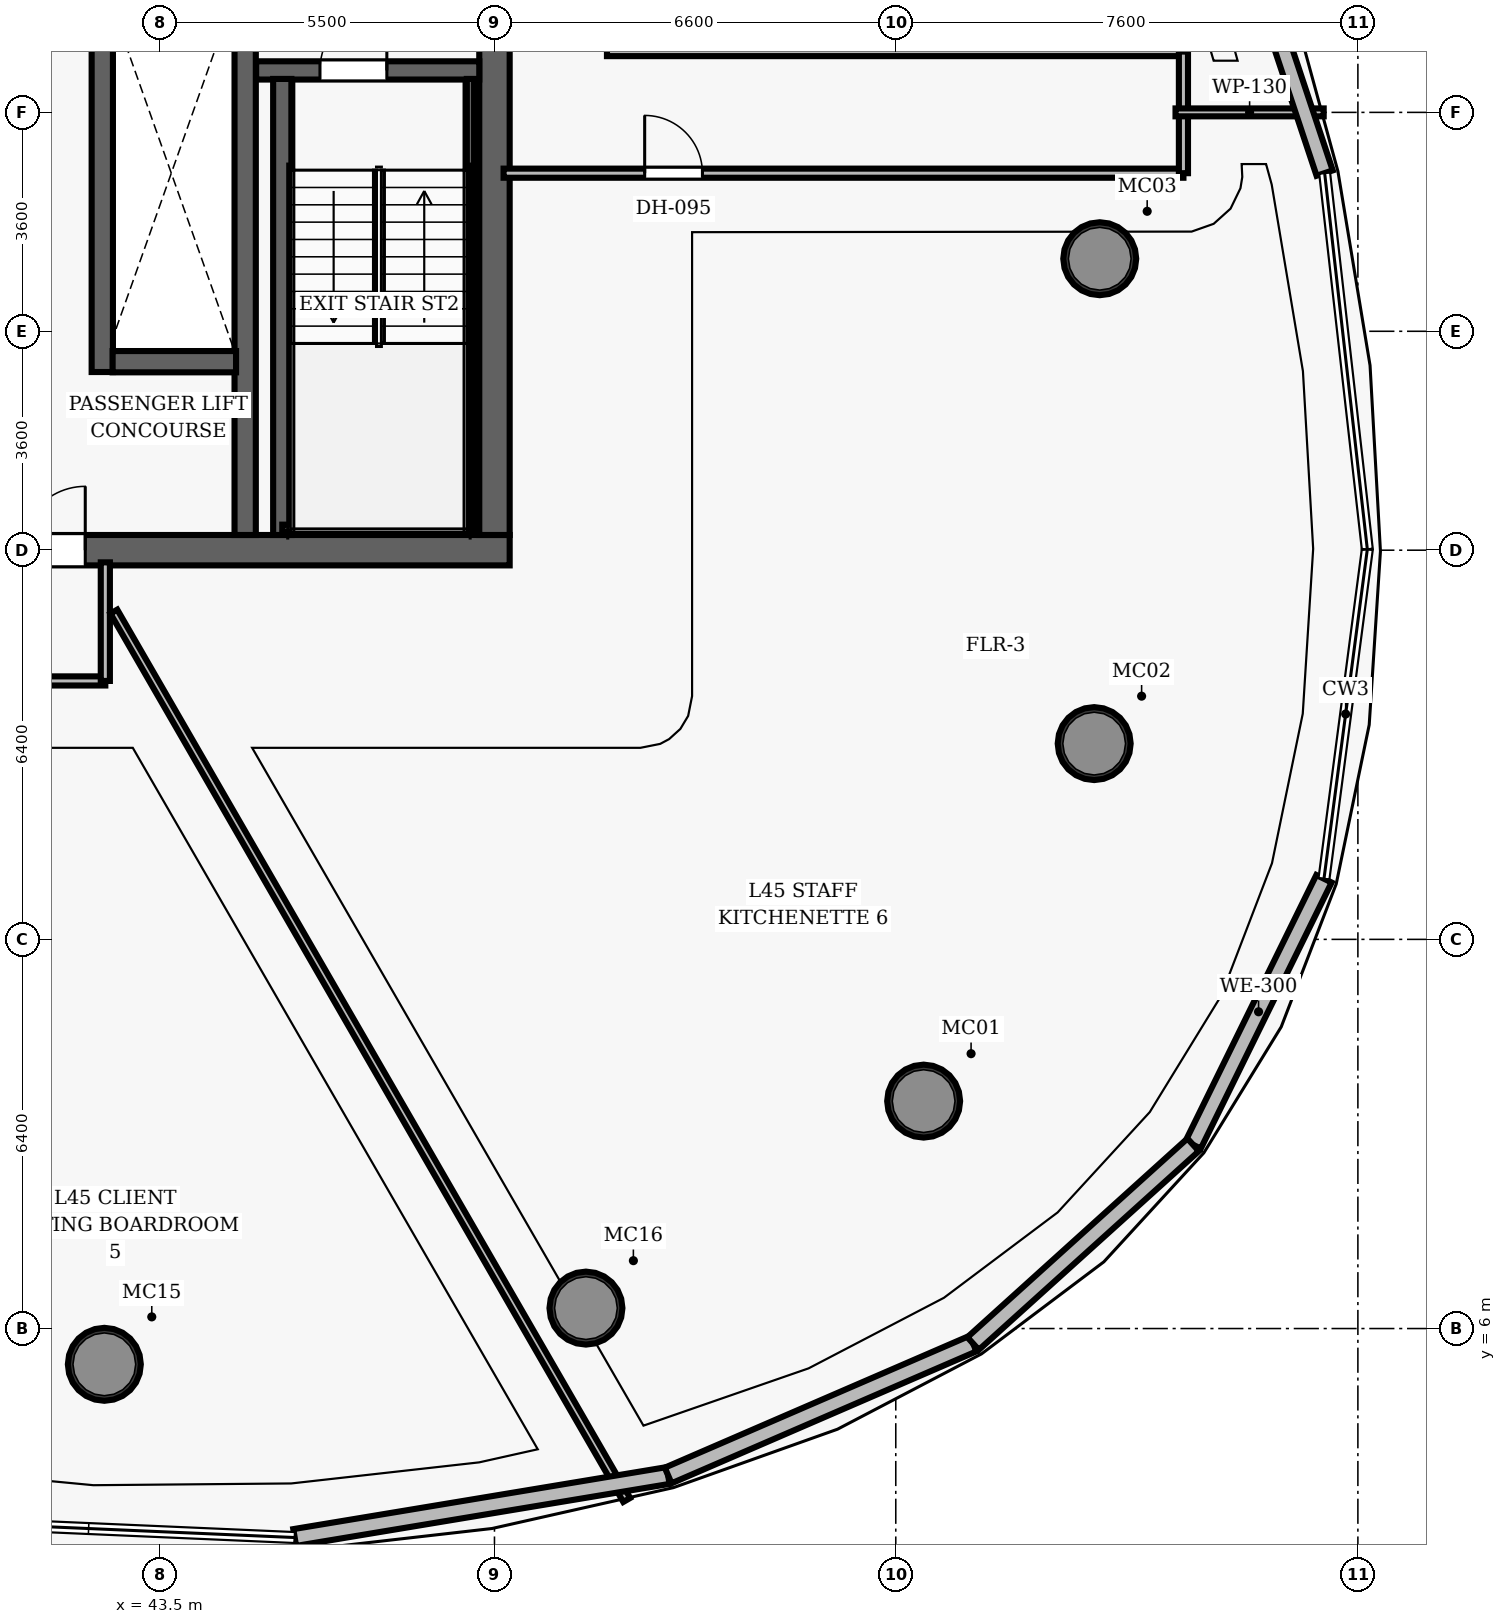
"""IFC4 building model, lengths in metres.
Left out: names, types, materials, properties, quantities, classifications, styles, units other than length and angle.
Written with IfcOpenShell. Run it as: python <this file> out.ifc"""

import sys

from ifc_helpers import new_model, si_unit, direction, frame, frame_2d, origin, origin_2d, place, context, subcontext, project, spatial, rectangle, hollow_circle, extrude, element, fill, save


model = new_model("IFC4")
c1 = context("Model", 3, precision=1e-05, world=origin(), true_north=direction((0.0, 1.0)))
c2 = subcontext(c1, "Body", "Model", "MODEL_VIEW")
j1 = project(units=[si_unit("LENGTHUNIT", "METRE"), si_unit("PLANEANGLEUNIT", "RADIAN")], contexts=[c1])
p1 = place(None, origin())
s1 = spatial("IfcSite", under=j1, at=p1, CompositionType="ELEMENT")
p2 = place(p1, origin())
s2 = spatial("IfcBuilding", under=s1, at=p2, CompositionType="ELEMENT")
p3 = place(p2, frame((0.0, 0.0, 178.9)))
s3 = spatial("IfcBuildingStorey", under=s2, at=p3, CompositionType="ELEMENT", Elevation=178.9)
p4 = place(p3, frame((26.75, 18.8, 0.0), z_axis=(0.0, 0.0, 1.0), x_axis=(1.0, 0.0, 0.0)))
e1 = element("IfcWall", 1, at=p4, inside=s3, PredefinedType="SHEAR", context=c2, shape_type="SweptSolid", body=[
    extrude(rectangle(XDim=22.5, YDim=0.5, at=frame_2d((11.25, 0.0))), origin(), (0.0, 0.0, 1.0), 3.85),
])
p5 = place(p4, frame((14.47, 0.0, 0.0)))
e2 = element("IfcOpeningElement", 2, at=p5, cuts=e1, PredefinedType="OPENING", context=c2, shape_type="SweptSolid", body=[
    extrude(rectangle(XDim=1.05, YDim=2.15, at=frame_2d((0.525, 1.075))), frame((0.0, 0.26, 0.0), z_axis=(0.0, -1.0, 0.0), x_axis=(1.0, 0.0, 0.0)), (0.0, 0.0, 1.0), 0.52),
])
p6 = place(p3, frame((49.0, 19.05, 0.0), z_axis=(0.0, 0.0, 1.0), x_axis=(0.0, 1.0, 0.0)))
e3 = element("IfcWall", 3, at=p6, inside=s3, PredefinedType="SHEAR", context=c2, shape_type="SweptSolid", body=[
    extrude(rectangle(XDim=13.9, YDim=0.5, at=frame_2d((6.95, 0.0))), origin(), (0.0, 0.0, 1.0), 3.85),
])
p7 = place(p6, frame((8.2, 0.0, 0.0)))
e4 = element("IfcOpeningElement", 4, at=p7, cuts=e3, PredefinedType="OPENING", context=c2, shape_type="SweptSolid", body=[
    extrude(rectangle(XDim=1.05, YDim=2.15, at=frame_2d((0.525, 1.075))), frame((0.0, 0.26, 0.0), z_axis=(0.0, -1.0, 0.0), x_axis=(1.0, 0.0, 0.0)), (0.0, 0.0, 1.0), 0.52),
])
p8 = place(p3, frame((44.9, 19.05, 0.0), z_axis=(0.0, 0.0, 1.0), x_axis=(0.0, 1.0, 0.0)))
e5 = element("IfcWall", 5, at=p8, inside=s3, PredefinedType="SHEAR", context=c2, shape_type="SweptSolid", body=[
    extrude(rectangle(XDim=13.9, YDim=0.35, at=frame_2d((6.95, 0.0))), origin(), (0.0, 0.0, 1.0), 3.85),
])
for number, where, z_axis, x_axis in (
    (6, (56.058, 9.74, 0.0), (0.0, 0.0, 1.0), (1.0, 0.0, 0.0)),
    (7, (58.863, 15.619, 0.0), (0.0, 0.0, 1.0), (1.0, 0.0, 0.0)),
    (8, (58.955, 23.594, 0.0), (0.0, 0.0, 1.0), (1.0, 0.0, 0.0)),
    (9, (42.584, 5.412, 0.0), (0.0, 0.0, 1.0), (1.0, 0.0, 0.0)),
    (10, (50.504, 6.336, 0.0), (0.0, 0.0, 1.0), (1.0, 0.0, 0.0)),
):
    element("IfcColumn", number, at=place(p3, frame(where, z_axis=z_axis, x_axis=x_axis)), inside=s3, PredefinedType="COLUMN", context=c2, shape_type="SweptSolid", body=[
        extrude(hollow_circle(Radius=0.6, WallThickness=0.05, at=origin_2d()), origin(), (0.0, 0.0, 1.0), 3.85),
    ])
p9 = place(p3, frame((45.08, 26.69, 0.0), z_axis=(0.0, 0.0, 1.0), x_axis=(1.0, 0.0, 0.0)))
e11 = element("IfcWall", 11, at=p9, inside=s3, PredefinedType="SHEAR", context=c2, shape_type="SweptSolid", body=[
    extrude(rectangle(XDim=3.67, YDim=0.3, at=frame_2d((1.835, 0.0))), origin(), (0.0, 0.0, 1.0), 3.85),
])
p10 = place(p9, frame((1.05, 0.0, 0.0)))
e12 = element("IfcOpeningElement", 12, at=p10, cuts=e11, PredefinedType="OPENING", context=c2, shape_type="SweptSolid", body=[
    extrude(rectangle(XDim=1.1, YDim=2.15, at=frame_2d((0.55, 1.075))), frame((0.0, 0.16, 0.0), z_axis=(0.0, -1.0, 0.0), x_axis=(1.0, 0.0, 0.0)), (0.0, 0.0, 1.0), 0.32),
])
p11 = place(p3, frame((45.51, 19.05, 0.0), z_axis=(0.0, 0.0, 1.0), x_axis=(0.0, 1.0, 0.0)))
e13 = element("IfcWall", 13, at=p11, inside=s3, PredefinedType="SHEAR", context=c2, shape_type="SweptSolid", body=[
    extrude(rectangle(XDim=7.5, YDim=0.3, at=frame_2d((3.75, 0.0))), origin(), (0.0, 0.0, 1.0), 3.85),
])
p12 = place(p3, frame((48.605, 19.1, 0.0), z_axis=(0.0, 0.0, 1.0), x_axis=(0.0, 1.0, 0.0)))
e14 = element("IfcWall", 14, at=p12, inside=s3, PredefinedType="SHEAR", context=c2, shape_type="SweptSolid", body=[
    extrude(rectangle(XDim=7.45, YDim=0.12, at=frame_2d((3.725, 0.0))), origin(), (0.0, 0.0, 1.0), 3.85),
])
p13 = place(p3, frame((45.51, 19.16, 0.0), z_axis=(0.0, 0.0, 1.0), x_axis=(1.0, 0.0, 0.0)))
e15 = element("IfcWall", 15, at=p13, inside=s3, PredefinedType="SHEAR", context=c2, shape_type="SweptSolid", body=[
    extrude(rectangle(XDim=3.095, YDim=0.12, at=frame_2d((1.547, 0.0))), origin(), (0.0, 0.0, 1.0), 3.85),
])
p14 = place(p3, frame((42.55, 21.73, 0.0), z_axis=(0.0, 0.0, 1.0), x_axis=(0.0, 1.0, 0.0)))
e16 = element("IfcWall", 16, at=p14, inside=s3, PredefinedType="SHEAR", context=c2, shape_type="SweptSolid", body=[
    extrude(rectangle(XDim=6.54, YDim=0.35, at=frame_2d((3.27, 0.0))), origin(), (0.0, 0.0, 1.0), 3.035),
])
p15 = place(p3, frame((42.72, 21.9, 0.0), z_axis=(0.0, 0.0, 1.0), x_axis=(1.0, 0.0, 0.0)))
e17 = element("IfcWall", 17, at=p15, inside=s3, PredefinedType="SHEAR", context=c2, shape_type="SweptSolid", body=[
    extrude(rectangle(XDim=2.03, YDim=0.35, at=frame_2d((1.015, 0.0))), origin(), (0.0, 0.0, 1.0), 3.035),
])
p16 = place(p3, frame((50.85, 27.0, 0.0), z_axis=(0.0, 0.0, 1.0), x_axis=(1.0, 0.0, 0.0)))
e18 = element("IfcWall", 18, at=p16, inside=s3, PredefinedType="PARTITIONING", context=c2, shape_type="SweptSolid", body=[
    extrude(rectangle(XDim=9.481, YDim=0.15, at=frame_2d((4.74, 0.0))), origin(), (0.0, 0.0, 1.0), 3.035),
])
p17 = place(p3, frame((49.15, 25.0, 0.0), z_axis=(0.0, 0.0, 1.0), x_axis=(1.0, 0.0, 0.0)))
e19 = element("IfcWall", 19, at=p17, inside=s3, PredefinedType="PARTITIONING", context=c2, shape_type="SweptSolid", body=[
    extrude(rectangle(XDim=11.181, YDim=0.15, at=frame_2d((5.591, 0.0))), origin(), (0.0, 0.0, 1.0), 3.035),
])
p18 = place(p17, frame((2.32, 0.0, 0.0)))
e20 = element("IfcOpeningElement", 20, at=p18, cuts=e19, PredefinedType="OPENING", context=c2, shape_type="SweptSolid", body=[
    extrude(rectangle(XDim=0.95, YDim=2.15, at=frame_2d((0.475, 1.075))), frame((0.0, 0.085, 0.0), z_axis=(0.0, -1.0, 0.0), x_axis=(1.0, 0.0, 0.0)), (0.0, 0.0, 1.0), 0.17),
])
p19 = place(p3, frame((60.331, 25.0, 0.0), z_axis=(0.0, 0.0, 1.0), x_axis=(0.0, 1.0, 0.0)))
e21 = element("IfcWall", 21, at=p19, inside=s3, PredefinedType="PARTITIONING", context=c2, shape_type="SweptSolid", body=[
    extrude(rectangle(XDim=2.0, YDim=0.15, at=frame_2d((1.0, 0.0))), origin(), (0.0, 0.0, 1.0), 3.035),
])
p20 = place(p3, frame((39.05, 16.65, 0.0), z_axis=(0.0, 0.0, 1.0), x_axis=(1.0, 0.0, 0.0)))
e22 = element("IfcWall", 22, at=p20, inside=s3, PredefinedType="PARTITIONING", context=c2, shape_type="SweptSolid", body=[
    extrude(rectangle(XDim=3.55, YDim=0.15, at=frame_2d((1.775, 0.0))), origin(), (0.0, 0.0, 1.0), 3.035),
])
p21 = place(p3, frame((42.6, 16.65, 0.0), z_axis=(0.0, 0.0, 1.0), x_axis=(0.0, 1.0, 0.0)))
e23 = element("IfcWall", 23, at=p21, inside=s3, PredefinedType="PARTITIONING", context=c2, shape_type="SweptSolid", body=[
    extrude(rectangle(XDim=1.95, YDim=0.15, at=frame_2d((0.975, 0.0))), origin(), (0.0, 0.0, 1.0), 3.035),
])
p22 = place(p3, frame((60.201, 26.0, 0.0), z_axis=(0.0, 0.0, 1.0), x_axis=(1.0, 0.0, 0.0)))
e24 = element("IfcWall", 24, at=p22, inside=s3, PredefinedType="PARTITIONING", context=c2, shape_type="SweptSolid", body=[
    extrude(rectangle(XDim=2.437, YDim=0.13, at=frame_2d((1.219, 0.0))), origin(), (0.0, 0.0, 1.0), 3.035),
])
p23 = place(p3, frame((42.74, 17.79, 0.0), z_axis=(0.0, 0.0, 1.0), x_axis=(0.500003906344, -0.866023148444, 0.0)))
e25 = element("IfcWall", 25, at=p23, inside=s3, PredefinedType="PARTITIONING", context=c2, shape_type="SweptSolid", body=[
    extrude(rectangle(XDim=16.869, YDim=0.13, at=frame_2d((8.435, 0.0))), origin(), (0.0, 0.0, 1.0), 3.035),
])
p24 = place(p3, frame((62.642, 13.397, 0.0), z_axis=(0.0, 0.0, 1.0), x_axis=(-0.441235718271, -0.897391241835, 0.0)))
e26 = element("IfcWall", 26, at=p24, inside=s3, PredefinedType="SOLIDWALL", context=c2, shape_type="SweptSolid", body=[
    extrude(rectangle(XDim=4.876, YDim=0.28, at=frame_2d((2.438, 0.0))), origin(), (0.0, 0.0, 1.0), 3.62),
])
p25 = place(p3, frame((60.512, 31.439, 0.0), z_axis=(0.0, 0.0, 1.0), x_axis=(0.315590755591, -0.948895397283, 0.0)))
e27 = element("IfcWall", 27, at=p25, inside=s3, PredefinedType="SOLIDWALL", context=c2, shape_type="SweptSolid", body=[
    extrude(rectangle(XDim=6.784, YDim=0.28, at=frame_2d((3.392, 0.0))), origin(), (0.0, 0.0, 1.0), 3.62),
])
p26 = place(p3, frame((51.856, 3.583, 0.0), z_axis=(0.0, 0.0, 1.0), x_axis=(-0.986490190097, -0.163820343186, 0.0)))
e28 = element("IfcWall", 28, at=p26, inside=s3, PredefinedType="SOLIDWALL", context=c2, shape_type="SweptSolid", body=[
    extrude(rectangle(XDim=6.227, YDim=0.28, at=frame_2d((3.113, 0.0))), origin(), (0.0, 0.0, 1.0), 3.62),
])
p27 = place(p3, frame((56.872, 5.753, 0.0), z_axis=(0.0, 0.0, 1.0), x_axis=(-0.917776074032, -0.397098322753, 0.0)))
e29 = element("IfcWall", 29, at=p27, inside=s3, PredefinedType="SOLIDWALL", context=c2, shape_type="SweptSolid", body=[
    extrude(rectangle(XDim=5.464, YDim=0.28, at=frame_2d((2.732, 0.0))), origin(), (0.0, 0.0, 1.0), 3.62),
])
p28 = place(p3, frame((60.491, 9.021, 0.0), z_axis=(0.0, 0.0, 1.0), x_axis=(-0.742187793078, -0.670191972352, 0.0)))
e30 = element("IfcWall", 30, at=p28, inside=s3, PredefinedType="SOLIDWALL", context=c2, shape_type="SweptSolid", body=[
    extrude(rectangle(XDim=4.876, YDim=0.28, at=frame_2d((2.438, 0.0))), origin(), (0.0, 0.0, 1.0), 3.62),
])
p29 = place(p10, origin())
e31 = element("IfcDoor", 31, at=p29, inside=s3, OperationType="SINGLE_SWING_RIGHT", PredefinedType="DOOR", context=c2, shape_type="SweptSolid", body=[
    extrude(rectangle(XDim=1.1, YDim=2.15, at=frame_2d((0.55, 1.075))), frame((0.0, 0.025, 0.0), z_axis=(0.0, -1.0, 0.0), x_axis=(1.0, 0.0, 0.0)), (0.0, 0.0, 1.0), 0.05),
])
fill(e12, e31)
p30 = place(p5, origin())
e32 = element("IfcDoor", 32, at=p30, inside=s3, OperationType="SINGLE_SWING_RIGHT", PredefinedType="DOOR", context=c2, shape_type="SweptSolid", body=[
    extrude(rectangle(XDim=1.05, YDim=2.15, at=frame_2d((0.525, 1.075))), frame((0.0, 0.025, 0.0), z_axis=(0.0, -1.0, 0.0), x_axis=(1.0, 0.0, 0.0)), (0.0, 0.0, 1.0), 0.05),
])
fill(e2, e32)
p31 = place(p18, origin())
e33 = element("IfcDoor", 33, at=p31, inside=s3, OperationType="SINGLE_SWING_LEFT", PredefinedType="DOOR", context=c2, shape_type="SweptSolid", body=[
    extrude(rectangle(XDim=0.95, YDim=2.15, at=frame_2d((0.475, 1.075))), frame((0.0, 0.025, 0.0), z_axis=(0.0, -1.0, 0.0), x_axis=(1.0, 0.0, 0.0)), (0.0, 0.0, 1.0), 0.05),
])
fill(e20, e33)
save(model, sys.argv[1])
